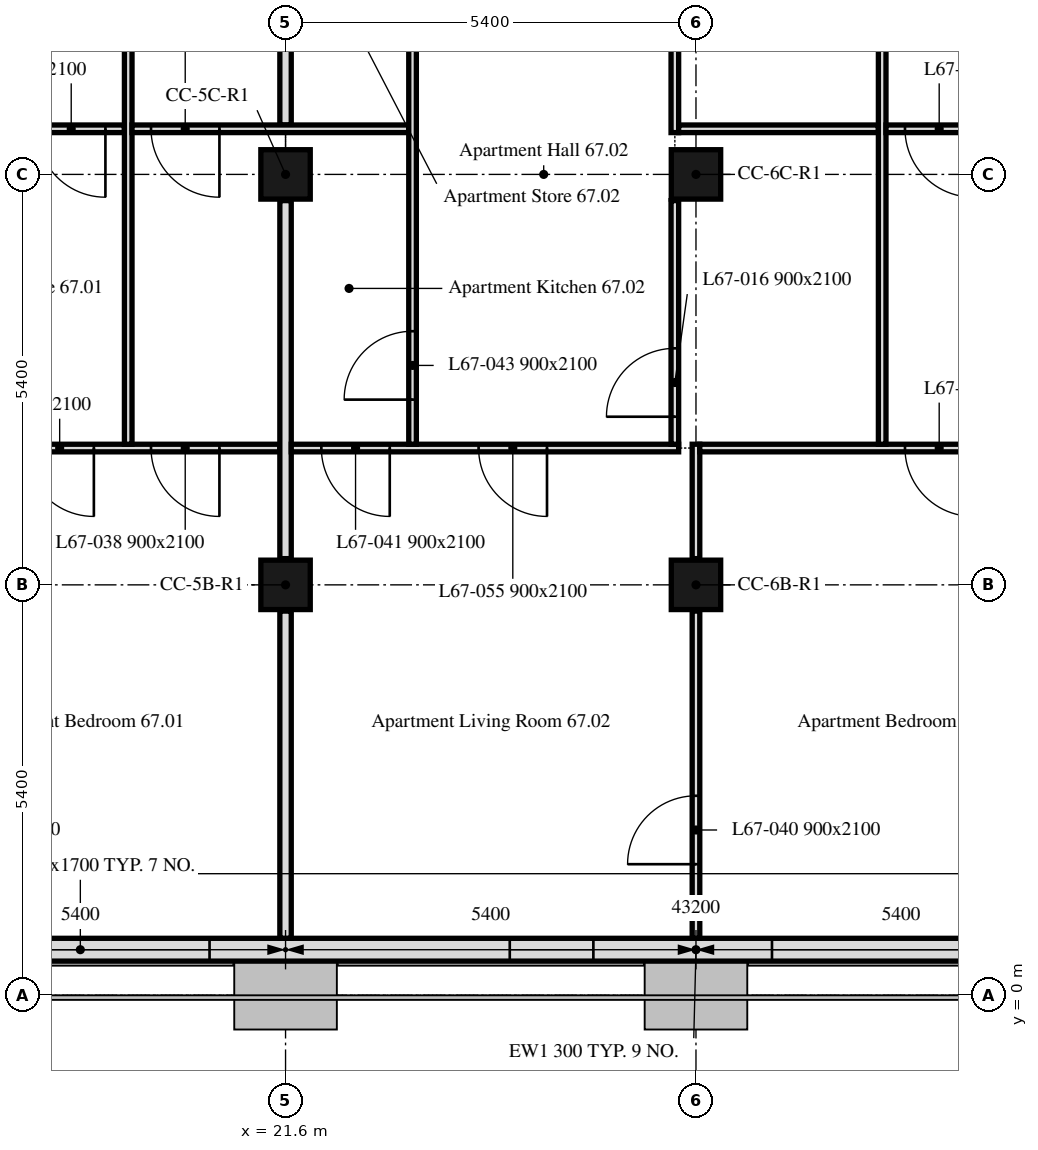
"""IFC4 building model, lengths in metres.
Left out: names, types, materials, properties, quantities, classifications, styles, units other than length and angle.
Written with IfcOpenShell. Run it as: python <this file> out.ifc"""

import sys

from ifc_helpers import new_model, si_unit, direction, frame, frame_2d, origin, origin_2d, place, context, subcontext, project, spatial, rectangle, extrude, element, fill, save


model = new_model("IFC4")
c1 = context("Model", 3, precision=1e-05, world=origin(), true_north=direction((0.0, 1.0)))
c2 = subcontext(c1, "Body", "Model", "MODEL_VIEW")
j1 = project(units=[si_unit("LENGTHUNIT", "METRE"), si_unit("PLANEANGLEUNIT", "RADIAN")], contexts=[c1])
p1 = place(None, origin())
s1 = spatial("IfcSite", under=j1, at=p1, CompositionType="ELEMENT")
p2 = place(p1, origin())
s2 = spatial("IfcBuilding", under=s1, at=p2, CompositionType="ELEMENT")
p3 = place(p2, frame((0.0, 0.0, 275.2)))
s3 = spatial("IfcBuildingStorey", under=s2, at=p3, CompositionType="ELEMENT", Elevation=275.2)
for number, where, z_axis, x_axis in (
    (1, (21.6, 5.4, 0.0), (0.0, 0.0, 1.0), (1.0, 0.0, 0.0)),
    (2, (27.0, 5.4, 0.0), (0.0, 0.0, 1.0), (1.0, 0.0, 0.0)),
    (3, (21.6, 10.8, 0.0), (0.0, 0.0, 1.0), (1.0, 0.0, 0.0)),
    (4, (27.0, 10.8, 0.0), (0.0, 0.0, 1.0), (1.0, 0.0, 0.0)),
):
    element("IfcColumn", number, at=place(p3, frame(where, z_axis=z_axis, x_axis=x_axis)), inside=s3, PredefinedType="COLUMN", context=c2, shape_type="SweptSolid", body=[
        extrude(rectangle(XDim=0.65, YDim=0.65, at=origin_2d()), origin(), (0.0, 0.0, 1.0), 3.0),
    ])
p4 = place(p3, frame((10.986, 0.6, 0.0), z_axis=(0.0, 0.0, 1.0), x_axis=(1.0, 0.0, 0.0)))
e5 = element("IfcWall", 5, at=p4, inside=s3, PredefinedType="SOLIDWALL", context=c2, shape_type="SweptSolid", body=[
    extrude(rectangle(XDim=32.027, YDim=0.3, at=frame_2d((16.014, 0.0))), origin(), (0.0, 0.0, 1.0), 3.0),
])
p5 = place(p4, frame((2.764, 0.0, 0.9)))
e6 = element("IfcOpeningElement", 6, at=p5, cuts=e5, PredefinedType="OPENING", context=c2, shape_type="SweptSolid", body=[
    extrude(rectangle(XDim=1.1, YDim=1.7, at=frame_2d((0.55, 0.85))), frame((0.0, 0.16, 0.0), z_axis=(0.0, -1.0, 0.0), x_axis=(1.0, 0.0, 0.0)), (0.0, 0.0, 1.0), 0.32),
])
p6 = place(p4, frame((6.214, 0.0, 0.9)))
e7 = element("IfcOpeningElement", 7, at=p6, cuts=e5, PredefinedType="OPENING", context=c2, shape_type="SweptSolid", body=[
    extrude(rectangle(XDim=3.4, YDim=1.7, at=frame_2d((1.7, 0.85))), frame((0.0, 0.16, 0.0), z_axis=(0.0, -1.0, 0.0), x_axis=(1.0, 0.0, 0.0)), (0.0, 0.0, 1.0), 0.32),
])
p7 = place(p4, frame((13.564, 0.0, 0.9)))
e8 = element("IfcOpeningElement", 8, at=p7, cuts=e5, PredefinedType="OPENING", context=c2, shape_type="SweptSolid", body=[
    extrude(rectangle(XDim=1.1, YDim=1.7, at=frame_2d((0.55, 0.85))), frame((0.0, 0.16, 0.0), z_axis=(0.0, -1.0, 0.0), x_axis=(1.0, 0.0, 0.0)), (0.0, 0.0, 1.0), 0.32),
])
p8 = place(p4, frame((17.014, 0.0, 0.9)))
e9 = element("IfcOpeningElement", 9, at=p8, cuts=e5, PredefinedType="OPENING", context=c2, shape_type="SweptSolid", body=[
    extrude(rectangle(XDim=3.4, YDim=1.7, at=frame_2d((1.7, 0.85))), frame((0.0, 0.16, 0.0), z_axis=(0.0, -1.0, 0.0), x_axis=(1.0, 0.0, 0.0)), (0.0, 0.0, 1.0), 0.32),
])
p9 = place(p4, frame((24.364, 0.0, 0.9)))
e10 = element("IfcOpeningElement", 10, at=p9, cuts=e5, PredefinedType="OPENING", context=c2, shape_type="SweptSolid", body=[
    extrude(rectangle(XDim=1.1, YDim=1.7, at=frame_2d((0.55, 0.85))), frame((0.0, 0.16, 0.0), z_axis=(0.0, -1.0, 0.0), x_axis=(1.0, 0.0, 0.0)), (0.0, 0.0, 1.0), 0.32),
])
p10 = place(p4, frame((27.814, 0.0, 0.9)))
e11 = element("IfcOpeningElement", 11, at=p10, cuts=e5, PredefinedType="OPENING", context=c2, shape_type="SweptSolid", body=[
    extrude(rectangle(XDim=3.4, YDim=1.7, at=frame_2d((1.7, 0.85))), frame((0.0, 0.16, 0.0), z_axis=(0.0, -1.0, 0.0), x_axis=(1.0, 0.0, 0.0)), (0.0, 0.0, 1.0), 0.32),
])
p11 = place(p3, frame((21.6, 0.751, 0.0), z_axis=(0.0, 0.0, 1.0), x_axis=(0.0, 1.0, 0.0)))
e12 = element("IfcWall", 12, at=p11, inside=s3, PredefinedType="PARTITIONING", context=c2, shape_type="SweptSolid", body=[
    extrude(rectangle(XDim=4.304, YDim=0.15, at=frame_2d((2.152, 0.0))), origin(), (0.0, 0.0, 1.0), 2.4),
])
p12 = place(p3, frame((21.525, 7.2, 0.0), z_axis=(0.0, 0.0, 1.0), x_axis=(-1.0, 0.0, 0.0)))
e13 = element("IfcWall", 13, at=p12, inside=s3, PredefinedType="PARTITIONING", context=c2, shape_type="SweptSolid", body=[
    extrude(rectangle(XDim=5.275, YDim=0.1, at=frame_2d((2.637, 0.0))), origin(), (0.0, 0.0, 1.0), 3.0),
])
p13 = place(p12, frame((2.447, 0.0, 0.0)))
e14 = element("IfcOpeningElement", 14, at=p13, cuts=e13, PredefinedType="OPENING", context=c2, shape_type="SweptSolid", body=[
    extrude(rectangle(XDim=0.9, YDim=2.1, at=frame_2d((0.45, 1.05))), frame((0.0, 0.05, 0.0), z_axis=(0.0, -1.0, 0.0), x_axis=(1.0, 0.0, 0.0)), (0.0, 0.0, 1.0), 0.1),
])
p14 = place(p12, frame((0.795, 0.0, 0.0)))
e15 = element("IfcOpeningElement", 15, at=p14, cuts=e13, PredefinedType="OPENING", context=c2, shape_type="SweptSolid", body=[
    extrude(rectangle(XDim=0.9, YDim=2.1, at=frame_2d((0.45, 1.05))), frame((0.0, 0.05, 0.0), z_axis=(0.0, -1.0, 0.0), x_axis=(1.0, 0.0, 0.0)), (0.0, 0.0, 1.0), 0.1),
])
p15 = place(p3, frame((19.48, 11.4, 0.0), z_axis=(0.0, 0.0, 1.0), x_axis=(-1.0, 0.0, 0.0)))
e16 = element("IfcWall", 16, at=p15, inside=s3, PredefinedType="PARTITIONING", context=c2, shape_type="SweptSolid", body=[
    extrude(rectangle(XDim=3.35, YDim=0.1, at=frame_2d((1.675, 0.0))), origin(), (0.0, 0.0, 1.0), 3.0),
])
p16 = place(p15, frame((0.25, 0.0, 0.0)))
e17 = element("IfcOpeningElement", 17, at=p16, cuts=e16, PredefinedType="OPENING", context=c2, shape_type="SweptSolid", body=[
    extrude(rectangle(XDim=0.9, YDim=2.1, at=frame_2d((0.45, 1.05))), frame((0.0, 0.05, 0.0), z_axis=(0.0, -1.0, 0.0), x_axis=(1.0, 0.0, 0.0)), (0.0, 0.0, 1.0), 0.1),
])
p17 = place(p3, frame((19.53, 7.25, 0.0), z_axis=(0.0, 0.0, 1.0), x_axis=(0.0, 1.0, 0.0)))
e18 = element("IfcWall", 18, at=p17, inside=s3, PredefinedType="PARTITIONING", context=c2, shape_type="SweptSolid", body=[
    extrude(rectangle(XDim=7.075, YDim=0.1, at=frame_2d((3.538, 0.0))), origin(), (0.0, 0.0, 1.0), 3.0),
])
p18 = place(p3, frame((21.6, 5.745, 0.0), z_axis=(0.0, 0.0, 1.0), x_axis=(0.0, 1.0, 0.0)))
e19 = element("IfcWall", 19, at=p18, inside=s3, PredefinedType="PARTITIONING", context=c2, shape_type="SweptSolid", body=[
    extrude(rectangle(XDim=4.71, YDim=0.15, at=frame_2d((2.355, 0.0))), origin(), (0.0, 0.0, 1.0), 2.4),
])
p19 = place(p3, frame((21.6, 11.45, 0.0), z_axis=(0.0, 0.0, 1.0), x_axis=(0.0, 1.0, 0.0)))
e20 = element("IfcWall", 20, at=p19, inside=s3, PredefinedType="PARTITIONING", context=c2, shape_type="SweptSolid", body=[
    extrude(rectangle(XDim=2.875, YDim=0.15, at=frame_2d((1.438, 0.0))), origin(), (0.0, 0.0, 1.0), 2.4),
])
p20 = place(p3, frame((27.0, 0.751, 0.0), z_axis=(0.0, 0.0, 1.0), x_axis=(0.0, 1.0, 0.0)))
e21 = element("IfcWall", 21, at=p20, inside=s3, PredefinedType="PARTITIONING", context=c2, shape_type="SweptSolid", body=[
    extrude(rectangle(XDim=4.304, YDim=0.1, at=frame_2d((2.152, 0.0))), origin(), (0.0, 0.0, 1.0), 2.4),
])
p21 = place(p20, frame((0.974, 0.0, 0.0)))
e22 = element("IfcOpeningElement", 22, at=p21, cuts=e21, PredefinedType="OPENING", context=c2, shape_type="SweptSolid", body=[
    extrude(rectangle(XDim=0.9, YDim=2.1, at=frame_2d((0.45, 1.05))), frame((0.0, 0.05, 0.0), z_axis=(0.0, -1.0, 0.0), x_axis=(1.0, 0.0, 0.0)), (0.0, 0.0, 1.0), 0.1),
])
p22 = place(p3, frame((27.0, 5.745, 0.0), z_axis=(0.0, 0.0, 1.0), x_axis=(0.0, 1.0, 0.0)))
e23 = element("IfcWall", 23, at=p22, inside=s3, PredefinedType="PARTITIONING", context=c2, shape_type="SweptSolid", body=[
    extrude(rectangle(XDim=1.505, YDim=0.1, at=frame_2d((0.752, 0.0))), origin(), (0.0, 0.0, 1.0), 2.4),
])
p23 = place(p3, frame((26.772, 7.2, 0.0), z_axis=(0.0, 0.0, 1.0), x_axis=(-1.0, 0.0, 0.0)))
e24 = element("IfcWall", 24, at=p23, inside=s3, PredefinedType="PARTITIONING", context=c2, shape_type="SweptSolid", body=[
    extrude(rectangle(XDim=5.097, YDim=0.1, at=frame_2d((2.548, 0.0))), origin(), (0.0, 0.0, 1.0), 3.0),
])
p24 = place(p23, frame((3.801, 0.0, 0.0)))
e25 = element("IfcOpeningElement", 25, at=p24, cuts=e24, PredefinedType="OPENING", context=c2, shape_type="SweptSolid", body=[
    extrude(rectangle(XDim=0.9, YDim=2.1, at=frame_2d((0.45, 1.05))), frame((0.0, 0.05, 0.0), z_axis=(0.0, -1.0, 0.0), x_axis=(1.0, 0.0, 0.0)), (0.0, 0.0, 1.0), 0.1),
])
p25 = place(p23, frame((1.732, 0.0, 0.0)))
e26 = element("IfcOpeningElement", 26, at=p25, cuts=e24, PredefinedType="OPENING", context=c2, shape_type="SweptSolid", body=[
    extrude(rectangle(XDim=0.9, YDim=2.1, at=frame_2d((0.45, 1.05))), frame((0.0, 0.05, 0.0), z_axis=(0.0, -1.0, 0.0), x_axis=(1.0, 0.0, 0.0)), (0.0, 0.0, 1.0), 0.1),
])
p26 = place(p3, frame((32.325, 7.2, 0.0), z_axis=(0.0, 0.0, 1.0), x_axis=(-1.0, 0.0, 0.0)))
e27 = element("IfcWall", 27, at=p26, inside=s3, PredefinedType="PARTITIONING", context=c2, shape_type="SweptSolid", body=[
    extrude(rectangle(XDim=5.275, YDim=0.1, at=frame_2d((2.637, 0.0))), origin(), (0.0, 0.0, 1.0), 3.0),
])
p27 = place(p26, frame((1.675, 0.0, 0.0)))
e28 = element("IfcOpeningElement", 28, at=p27, cuts=e27, PredefinedType="OPENING", context=c2, shape_type="SweptSolid", body=[
    extrude(rectangle(XDim=0.9, YDim=2.1, at=frame_2d((0.45, 1.05))), frame((0.0, 0.05, 0.0), z_axis=(0.0, -1.0, 0.0), x_axis=(1.0, 0.0, 0.0)), (0.0, 0.0, 1.0), 0.1),
])
p28 = place(p3, frame((23.221, 11.4, 0.0), z_axis=(0.0, 0.0, 1.0), x_axis=(-1.0, 0.0, 0.0)))
e29 = element("IfcWall", 29, at=p28, inside=s3, PredefinedType="PARTITIONING", context=c2, shape_type="SweptSolid", body=[
    extrude(rectangle(XDim=3.641, YDim=0.1, at=frame_2d((1.82, 0.0))), origin(), (0.0, 0.0, 1.0), 2.4),
])
p29 = place(p28, frame((2.491, 0.0, 0.0)))
e30 = element("IfcOpeningElement", 30, at=p29, cuts=e29, PredefinedType="OPENING", context=c2, shape_type="SweptSolid", body=[
    extrude(rectangle(XDim=0.9, YDim=2.1, at=frame_2d((0.45, 1.05))), frame((0.0, 0.05, 0.0), z_axis=(0.0, -1.0, 0.0), x_axis=(1.0, 0.0, 0.0)), (0.0, 0.0, 1.0), 0.1),
])
p30 = place(p3, frame((23.271, 7.25, 0.0), z_axis=(0.0, 0.0, 1.0), x_axis=(0.0, 1.0, 0.0)))
e31 = element("IfcWall", 31, at=p30, inside=s3, PredefinedType="PARTITIONING", context=c2, shape_type="SweptSolid", body=[
    extrude(rectangle(XDim=7.075, YDim=0.1, at=frame_2d((3.538, 0.0))), origin(), (0.0, 0.0, 1.0), 3.0),
])
p31 = place(p30, frame((5.638, 0.0, 0.0)))
e32 = element("IfcOpeningElement", 32, at=p31, cuts=e31, PredefinedType="OPENING", context=c2, shape_type="SweptSolid", body=[
    extrude(rectangle(XDim=0.9, YDim=2.1, at=frame_2d((0.45, 1.05))), frame((0.0, 0.05, 0.0), z_axis=(0.0, -1.0, 0.0), x_axis=(1.0, 0.0, 0.0)), (0.0, 0.0, 1.0), 0.1),
])
p32 = place(p30, frame((0.587, 0.0, 0.0)))
e33 = element("IfcOpeningElement", 33, at=p32, cuts=e31, PredefinedType="OPENING", context=c2, shape_type="SweptSolid", body=[
    extrude(rectangle(XDim=0.9, YDim=2.1, at=frame_2d((0.45, 1.05))), frame((0.0, 0.05, 0.0), z_axis=(0.0, -1.0, 0.0), x_axis=(1.0, 0.0, 0.0)), (0.0, 0.0, 1.0), 0.1),
])
p33 = place(p3, frame((26.722, 7.25, 0.0), z_axis=(0.0, 0.0, 1.0), x_axis=(0.0, 1.0, 0.0)))
e34 = element("IfcWall", 34, at=p33, inside=s3, PredefinedType="PARTITIONING", context=c2, shape_type="SweptSolid", body=[
    extrude(rectangle(XDim=3.205, YDim=0.1, at=frame_2d((1.603, 0.0))), origin(), (0.0, 0.0, 1.0), 3.0),
])
p34 = place(p33, frame((0.362, 0.0, 0.0)))
e35 = element("IfcOpeningElement", 35, at=p34, cuts=e34, PredefinedType="OPENING", context=c2, shape_type="SweptSolid", body=[
    extrude(rectangle(XDim=0.9, YDim=2.1, at=frame_2d((0.45, 1.05))), frame((0.0, 0.05, 0.0), z_axis=(0.0, -1.0, 0.0), x_axis=(1.0, 0.0, 0.0)), (0.0, 0.0, 1.0), 0.1),
])
p35 = place(p3, frame((26.722, 11.35, 0.0), z_axis=(0.0, 0.0, 1.0), x_axis=(0.0, 1.0, 0.0)))
e36 = element("IfcWall", 36, at=p35, inside=s3, PredefinedType="PARTITIONING", context=c2, shape_type="SweptSolid", body=[
    extrude(rectangle(XDim=2.975, YDim=0.1, at=frame_2d((1.487, 0.0))), origin(), (0.0, 0.0, 1.0), 3.0),
])
p36 = place(p35, frame((1.825, 0.0, 0.0)))
e37 = element("IfcOpeningElement", 37, at=p36, cuts=e36, PredefinedType="OPENING", context=c2, shape_type="SweptSolid", body=[
    extrude(rectangle(XDim=0.9, YDim=2.1, at=frame_2d((0.45, 1.05))), frame((0.0, 0.05, 0.0), z_axis=(0.0, -1.0, 0.0), x_axis=(1.0, 0.0, 0.0)), (0.0, 0.0, 1.0), 0.1),
])
p37 = place(p3, frame((29.4, 11.4, 0.0), z_axis=(0.0, 0.0, 1.0), x_axis=(-1.0, 0.0, 0.0)))
e38 = element("IfcWall", 38, at=p37, inside=s3, PredefinedType="PARTITIONING", context=c2, shape_type="SweptSolid", body=[
    extrude(rectangle(XDim=2.628, YDim=0.1, at=frame_2d((1.314, 0.0))), origin(), (0.0, 0.0, 1.0), 2.4),
])
p38 = place(p3, frame((29.45, 7.25, 0.0), z_axis=(0.0, 0.0, 1.0), x_axis=(0.0, 1.0, 0.0)))
e39 = element("IfcWall", 39, at=p38, inside=s3, PredefinedType="PARTITIONING", context=c2, shape_type="SweptSolid", body=[
    extrude(rectangle(XDim=7.075, YDim=0.1, at=frame_2d((3.538, 0.0))), origin(), (0.0, 0.0, 1.0), 3.0),
])
p39 = place(p3, frame((35.085, 11.4, 0.0), z_axis=(0.0, 0.0, 1.0), x_axis=(-1.0, 0.0, 0.0)))
e40 = element("IfcWall", 40, at=p39, inside=s3, PredefinedType="PARTITIONING", context=c2, shape_type="SweptSolid", body=[
    extrude(rectangle(XDim=5.585, YDim=0.1, at=frame_2d((2.792, 0.0))), origin(), (0.0, 0.0, 1.0), 2.4),
])
p40 = place(p39, frame((4.435, 0.0, 0.0)))
e41 = element("IfcOpeningElement", 41, at=p40, cuts=e40, PredefinedType="OPENING", context=c2, shape_type="SweptSolid", body=[
    extrude(rectangle(XDim=0.9, YDim=2.1, at=frame_2d((0.45, 1.05))), frame((0.0, 0.05, 0.0), z_axis=(0.0, -1.0, 0.0), x_axis=(1.0, 0.0, 0.0)), (0.0, 0.0, 1.0), 0.1),
])
p41 = place(p6, origin())
e42 = element("IfcWindow", 42, at=p41, inside=s3, PartitioningType="SINGLE_PANEL", PredefinedType="WINDOW", context=c2, shape_type="SweptSolid", body=[
    extrude(rectangle(XDim=3.4, YDim=1.7, at=frame_2d((1.7, 0.85))), frame((0.0, 0.03, 0.0), z_axis=(0.0, -1.0, 0.0), x_axis=(1.0, 0.0, 0.0)), (0.0, 0.0, 1.0), 0.06),
])
fill(e7, e42)
p42 = place(p7, origin())
e43 = element("IfcWindow", 43, at=p42, inside=s3, PartitioningType="SINGLE_PANEL", PredefinedType="WINDOW", context=c2, shape_type="SweptSolid", body=[
    extrude(rectangle(XDim=1.1, YDim=1.7, at=frame_2d((0.55, 0.85))), frame((0.0, 0.03, 0.0), z_axis=(0.0, -1.0, 0.0), x_axis=(1.0, 0.0, 0.0)), (0.0, 0.0, 1.0), 0.06),
])
fill(e8, e43)
p43 = place(p8, origin())
e44 = element("IfcWindow", 44, at=p43, inside=s3, PartitioningType="SINGLE_PANEL", PredefinedType="WINDOW", context=c2, shape_type="SweptSolid", body=[
    extrude(rectangle(XDim=3.4, YDim=1.7, at=frame_2d((1.7, 0.85))), frame((0.0, 0.03, 0.0), z_axis=(0.0, -1.0, 0.0), x_axis=(1.0, 0.0, 0.0)), (0.0, 0.0, 1.0), 0.06),
])
fill(e9, e44)
p44 = place(p16, origin())
e45 = element("IfcDoor", 45, at=p44, inside=s3, OperationType="SINGLE_SWING_RIGHT", PredefinedType="DOOR", context=c2, shape_type="SweptSolid", body=[
    extrude(rectangle(XDim=0.9, YDim=2.1, at=frame_2d((0.45, 1.05))), frame((0.0, 0.025, 0.0), z_axis=(0.0, -1.0, 0.0), x_axis=(1.0, 0.0, 0.0)), (0.0, 0.0, 1.0), 0.05),
])
fill(e17, e45)
p45 = place(p29, origin())
e46 = element("IfcDoor", 46, at=p45, inside=s3, OperationType="SINGLE_SWING_RIGHT", PredefinedType="DOOR", context=c2, shape_type="SweptSolid", body=[
    extrude(rectangle(XDim=0.9, YDim=2.1, at=frame_2d((0.45, 1.05))), frame((0.0, 0.025, 0.0), z_axis=(0.0, -1.0, 0.0), x_axis=(1.0, 0.0, 0.0)), (0.0, 0.0, 1.0), 0.05),
])
fill(e30, e46)
p46 = place(p34, origin())
e47 = element("IfcDoor", 47, at=p46, inside=s3, OperationType="SINGLE_SWING_RIGHT", PredefinedType="DOOR", context=c2, shape_type="SweptSolid", body=[
    extrude(rectangle(XDim=0.9, YDim=2.1, at=frame_2d((0.45, 1.05))), frame((0.0, 0.025, 0.0), z_axis=(0.0, -1.0, 0.0), x_axis=(1.0, 0.0, 0.0)), (0.0, 0.0, 1.0), 0.05),
])
fill(e35, e47)
p47 = place(p40, origin())
e48 = element("IfcDoor", 48, at=p47, inside=s3, OperationType="SINGLE_SWING_RIGHT", PredefinedType="DOOR", context=c2, shape_type="SweptSolid", body=[
    extrude(rectangle(XDim=0.9, YDim=2.1, at=frame_2d((0.45, 1.05))), frame((0.0, 0.025, 0.0), z_axis=(0.0, -1.0, 0.0), x_axis=(1.0, 0.0, 0.0)), (0.0, 0.0, 1.0), 0.05),
])
fill(e41, e48)
p48 = place(p13, origin())
e49 = element("IfcDoor", 49, at=p48, inside=s3, OperationType="SINGLE_SWING_LEFT", PredefinedType="DOOR", context=c2, shape_type="SweptSolid", body=[
    extrude(rectangle(XDim=0.9, YDim=2.1, at=frame_2d((0.45, 1.05))), frame((0.0, 0.025, 0.0), z_axis=(0.0, -1.0, 0.0), x_axis=(1.0, 0.0, 0.0)), (0.0, 0.0, 1.0), 0.05),
])
fill(e14, e49)
p49 = place(p14, origin())
e50 = element("IfcDoor", 50, at=p49, inside=s3, OperationType="SINGLE_SWING_RIGHT", PredefinedType="DOOR", context=c2, shape_type="SweptSolid", body=[
    extrude(rectangle(XDim=0.9, YDim=2.1, at=frame_2d((0.45, 1.05))), frame((0.0, 0.025, 0.0), z_axis=(0.0, -1.0, 0.0), x_axis=(1.0, 0.0, 0.0)), (0.0, 0.0, 1.0), 0.05),
])
fill(e15, e50)
p50 = place(p21, origin())
e51 = element("IfcDoor", 51, at=p50, inside=s3, OperationType="SINGLE_SWING_RIGHT", PredefinedType="DOOR", context=c2, shape_type="SweptSolid", body=[
    extrude(rectangle(XDim=0.9, YDim=2.1, at=frame_2d((0.45, 1.05))), frame((0.0, 0.025, 0.0), z_axis=(0.0, -1.0, 0.0), x_axis=(1.0, 0.0, 0.0)), (0.0, 0.0, 1.0), 0.05),
])
fill(e22, e51)
p51 = place(p24, origin())
e52 = element("IfcDoor", 52, at=p51, inside=s3, OperationType="SINGLE_SWING_LEFT", PredefinedType="DOOR", context=c2, shape_type="SweptSolid", body=[
    extrude(rectangle(XDim=0.9, YDim=2.1, at=frame_2d((0.45, 1.05))), frame((0.0, 0.025, 0.0), z_axis=(0.0, -1.0, 0.0), x_axis=(1.0, 0.0, 0.0)), (0.0, 0.0, 1.0), 0.05),
])
fill(e25, e52)
p52 = place(p27, origin())
e53 = element("IfcDoor", 53, at=p52, inside=s3, OperationType="SINGLE_SWING_RIGHT", PredefinedType="DOOR", context=c2, shape_type="SweptSolid", body=[
    extrude(rectangle(XDim=0.9, YDim=2.1, at=frame_2d((0.45, 1.05))), frame((0.0, 0.025, 0.0), z_axis=(0.0, -1.0, 0.0), x_axis=(1.0, 0.0, 0.0)), (0.0, 0.0, 1.0), 0.05),
])
fill(e28, e53)
p53 = place(p32, origin())
e54 = element("IfcDoor", 54, at=p53, inside=s3, OperationType="SINGLE_SWING_RIGHT", PredefinedType="DOOR", context=c2, shape_type="SweptSolid", body=[
    extrude(rectangle(XDim=0.9, YDim=2.1, at=frame_2d((0.45, 1.05))), frame((0.0, 0.025, 0.0), z_axis=(0.0, -1.0, 0.0), x_axis=(1.0, 0.0, 0.0)), (0.0, 0.0, 1.0), 0.05),
])
fill(e33, e54)
p54 = place(p25, origin())
e55 = element("IfcDoor", 55, at=p54, inside=s3, OperationType="SINGLE_SWING_RIGHT", PredefinedType="DOOR", context=c2, shape_type="SweptSolid", body=[
    extrude(rectangle(XDim=0.9, YDim=2.1, at=frame_2d((0.45, 1.05))), frame((0.0, 0.025, 0.0), z_axis=(0.0, -1.0, 0.0), x_axis=(1.0, 0.0, 0.0)), (0.0, 0.0, 1.0), 0.05),
])
fill(e26, e55)
save(model, sys.argv[1])
